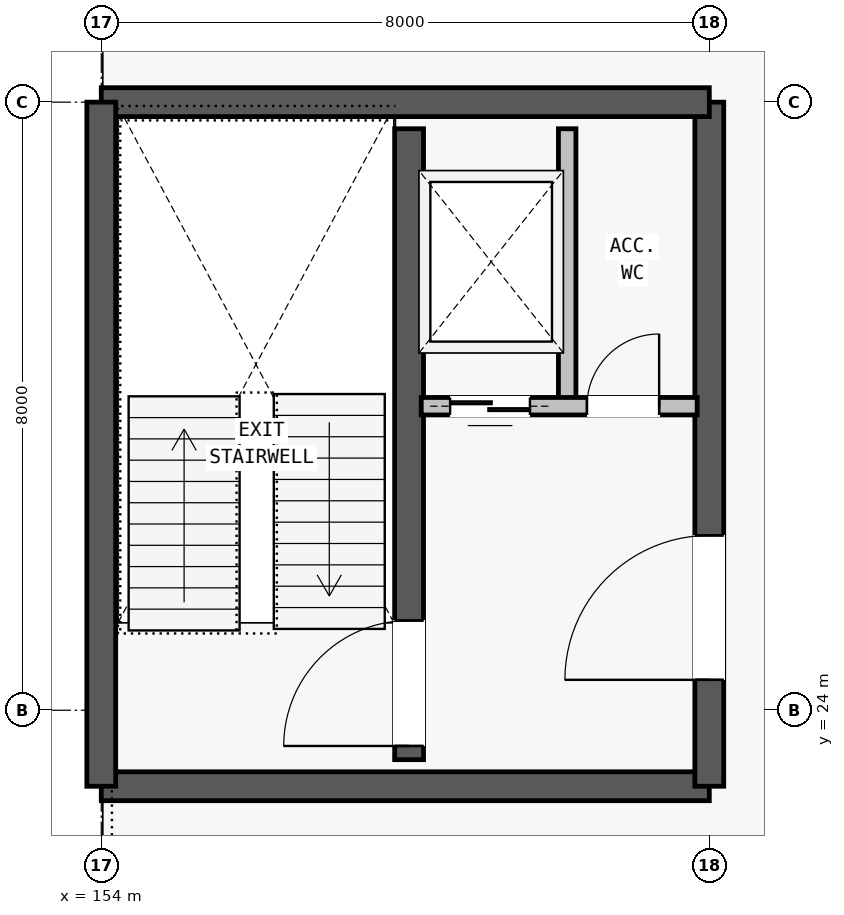
"""IFC4 building model, lengths in metres.
Left out: names, types, materials, properties, quantities, classifications, styles, units other than length and angle.
Written with IfcOpenShell. Run it as: python <this file> out.ifc"""

import sys

from ifc_helpers import new_model, si_unit, direction, frame, frame_2d, origin, place, context, subcontext, project, spatial, rectangle, extrude, element, fill, save


model = new_model("IFC4")
c1 = context("Model", 3, precision=1e-05, world=origin(), true_north=direction((0.0, 1.0)))
c2 = subcontext(c1, "Body", "Model", "MODEL_VIEW")
j1 = project(units=[si_unit("LENGTHUNIT", "METRE"), si_unit("PLANEANGLEUNIT", "RADIAN")], contexts=[c1])
p1 = place(None, origin())
s1 = spatial("IfcSite", under=j1, at=p1, CompositionType="ELEMENT")
p2 = place(p1, origin())
s2 = spatial("IfcBuilding", under=s1, at=p2, CompositionType="ELEMENT")
p3 = place(p2, frame((0.0, 0.0, 5.6)))
s3 = spatial("IfcBuildingStorey", under=s2, at=p3, CompositionType="ELEMENT", Elevation=5.6)
p4 = place(p3, frame((154.0, 23.0, 0.0), z_axis=(0.0, 0.0, 1.0), x_axis=(1.0, 0.0, 0.0)))
e1 = element("IfcWall", 1, at=p4, inside=s3, PredefinedType="SHEAR", context=c2, shape_type="SweptSolid", body=[
    extrude(rectangle(XDim=8.0, YDim=0.38, at=frame_2d((4.0, 0.0))), origin(), (0.0, 0.0, 1.0), 3.62),
])
p5 = place(p3, frame((162.0, 23.0, 0.0), z_axis=(0.0, 0.0, 1.0), x_axis=(0.0, 1.0, 0.0)))
e2 = element("IfcWall", 2, at=p5, inside=s3, PredefinedType="SHEAR", context=c2, shape_type="SweptSolid", body=[
    extrude(rectangle(XDim=9.0, YDim=0.38, at=frame_2d((4.5, 0.0))), origin(), (0.0, 0.0, 1.0), 3.62),
])
p6 = place(p5, frame((1.4, 0.0, 0.0)))
e3 = element("IfcOpeningElement", 3, at=p6, cuts=e2, PredefinedType="OPENING", context=c2, shape_type="SweptSolid", body=[
    extrude(rectangle(XDim=1.9, YDim=2.3, at=frame_2d((0.95, 1.15))), frame((0.0, 0.2, 0.0), z_axis=(0.0, -1.0, 0.0), x_axis=(1.0, 0.0, 0.0)), (0.0, 0.0, 1.0), 0.4),
])
p7 = place(p3, frame((162.0, 32.0, 0.0), z_axis=(0.0, 0.0, 1.0), x_axis=(-1.0, 0.0, 0.0)))
e4 = element("IfcWall", 4, at=p7, inside=s3, PredefinedType="SHEAR", context=c2, shape_type="SweptSolid", body=[
    extrude(rectangle(XDim=8.0, YDim=0.38, at=frame_2d((4.0, 0.0))), origin(), (0.0, 0.0, 1.0), 3.62),
])
p8 = place(p3, frame((154.0, 32.0, 0.0), z_axis=(0.0, 0.0, 1.0), x_axis=(0.0, -1.0, 0.0)))
e5 = element("IfcWall", 5, at=p8, inside=s3, PredefinedType="SHEAR", context=c2, shape_type="SweptSolid", body=[
    extrude(rectangle(XDim=9.0, YDim=0.38, at=frame_2d((4.5, 0.0))), origin(), (0.0, 0.0, 1.0), 3.62),
])
p9 = place(p3, frame((158.05, 23.35, 0.0), z_axis=(0.0, 0.0, 1.0), x_axis=(0.0, 1.0, 0.0)))
e6 = element("IfcWall", 6, at=p9, inside=s3, PredefinedType="SHEAR", context=c2, shape_type="SweptSolid", body=[
    extrude(rectangle(XDim=8.3, YDim=0.38, at=frame_2d((4.15, 0.0))), origin(), (0.0, 0.0, 1.0), 3.62),
])
p10 = place(p9, frame((0.18, 0.0, 0.0)))
e7 = element("IfcOpeningElement", 7, at=p10, cuts=e6, PredefinedType="OPENING", context=c2, shape_type="SweptSolid", body=[
    extrude(rectangle(XDim=1.65, YDim=2.2, at=frame_2d((0.825, 1.1))), frame((0.0, 0.2, 0.0), z_axis=(0.0, -1.0, 0.0), x_axis=(1.0, 0.0, 0.0)), (0.0, 0.0, 1.0), 0.4),
])
p11 = place(p3, frame((160.13, 28.0, 0.0), z_axis=(0.0, 0.0, 1.0), x_axis=(0.0, 1.0, 0.0)))
e8 = element("IfcWall", 8, at=p11, inside=s3, PredefinedType="PARTITIONING", context=c2, shape_type="SweptSolid", body=[
    extrude(rectangle(XDim=3.65, YDim=0.23, at=frame_2d((1.825, 0.0))), origin(), (0.0, 0.0, 1.0), 2.48),
])
p12 = place(p3, frame((158.21, 28.0, 0.0), z_axis=(0.0, 0.0, 1.0), x_axis=(1.0, 0.0, 0.0)))
e9 = element("IfcWall", 9, at=p12, inside=s3, PredefinedType="PARTITIONING", context=c2, shape_type="SweptSolid", body=[
    extrude(rectangle(XDim=3.63, YDim=0.23, at=frame_2d((1.815, 0.0))), origin(), (0.0, 0.0, 1.0), 2.48),
])
p13 = place(p12, frame((0.38, 0.0, 0.0)))
e10 = element("IfcOpeningElement", 10, at=p13, cuts=e9, PredefinedType="OPENING", context=c2, shape_type="SweptSolid", body=[
    extrude(rectangle(XDim=1.05, YDim=2.15, at=frame_2d((0.525, 1.075))), frame((0.0, 0.125, 0.0), z_axis=(0.0, -1.0, 0.0), x_axis=(1.0, 0.0, 0.0)), (0.0, 0.0, 1.0), 0.25),
])
p14 = place(p12, frame((2.18, 0.0, 0.0)))
e11 = element("IfcOpeningElement", 11, at=p14, cuts=e9, PredefinedType="OPENING", context=c2, shape_type="SweptSolid", body=[
    extrude(rectangle(XDim=0.95, YDim=2.1, at=frame_2d((0.475, 1.05))), frame((0.0, 0.125, 0.0), z_axis=(0.0, -1.0, 0.0), x_axis=(1.0, 0.0, 0.0)), (0.0, 0.0, 1.0), 0.25),
])
p15 = place(p6, origin())
e12 = element("IfcDoor", 12, at=p15, inside=s3, OperationType="SINGLE_SWING_LEFT", PredefinedType="DOOR", context=c2, shape_type="SweptSolid", body=[
    extrude(rectangle(XDim=1.9, YDim=2.3, at=frame_2d((0.95, 1.15))), frame((0.0, 0.025, 0.0), z_axis=(0.0, -1.0, 0.0), x_axis=(1.0, 0.0, 0.0)), (0.0, 0.0, 1.0), 0.05),
])
fill(e3, e12)
p16 = place(p10, origin())
e13 = element("IfcDoor", 13, at=p16, inside=s3, OperationType="SINGLE_SWING_LEFT", PredefinedType="DOOR", context=c2, shape_type="SweptSolid", body=[
    extrude(rectangle(XDim=1.65, YDim=2.2, at=frame_2d((0.825, 1.1))), frame((0.0, 0.025, 0.0), z_axis=(0.0, -1.0, 0.0), x_axis=(1.0, 0.0, 0.0)), (0.0, 0.0, 1.0), 0.05),
])
fill(e7, e13)
p17 = place(p13, origin())
e14 = element("IfcDoor", 14, at=p17, inside=s3, OperationType="SLIDING_TO_LEFT", PredefinedType="DOOR", context=c2, shape_type="SweptSolid", body=[
    extrude(rectangle(XDim=1.05, YDim=2.15, at=frame_2d((0.525, 1.075))), frame((0.0, 0.025, 0.0), z_axis=(0.0, -1.0, 0.0), x_axis=(1.0, 0.0, 0.0)), (0.0, 0.0, 1.0), 0.05),
])
fill(e10, e14)
p18 = place(p14, origin())
e15 = element("IfcDoor", 15, at=p18, inside=s3, OperationType="SINGLE_SWING_RIGHT", PredefinedType="DOOR", context=c2, shape_type="SweptSolid", body=[
    extrude(rectangle(XDim=0.95, YDim=2.1, at=frame_2d((0.475, 1.05))), frame((0.0, 0.025, 0.0), z_axis=(0.0, -1.0, 0.0), x_axis=(1.0, 0.0, 0.0)), (0.0, 0.0, 1.0), 0.05),
])
fill(e11, e15)
save(model, sys.argv[1])
